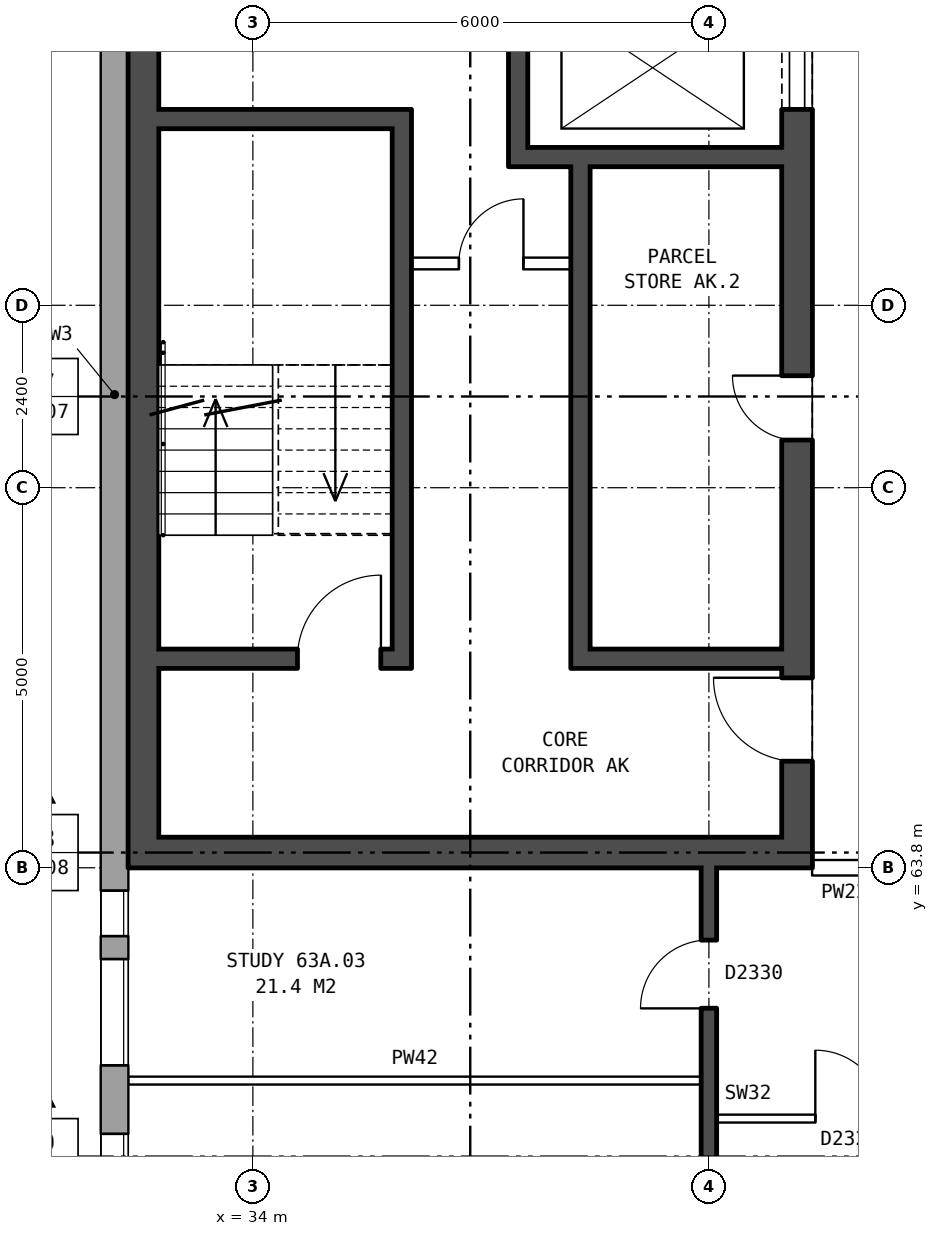
"""IFC4 building model, lengths in metres.
Left out: names, types, materials, properties, quantities, classifications, styles, units other than length and angle.
Written with IfcOpenShell. Run it as: python <this file> out.ifc"""

import sys

from ifc_helpers import new_model, si_unit, direction, frame, frame_2d, origin, place, context, subcontext, project, spatial, rectangle, extrude, element, fill, save


model = new_model("IFC4")
c1 = context("Model", 3, precision=1e-05, world=origin(), true_north=direction((0.0, 1.0)))
c2 = subcontext(c1, "Body", "Model", "MODEL_VIEW")
j1 = project(units=[si_unit("LENGTHUNIT", "METRE"), si_unit("PLANEANGLEUNIT", "RADIAN")], contexts=[c1])
p1 = place(None, origin())
s1 = spatial("IfcSite", under=j1, at=p1, CompositionType="ELEMENT")
p2 = place(p1, origin())
s2 = spatial("IfcBuilding", under=s1, at=p2, CompositionType="ELEMENT")
p3 = place(p2, frame((0.0, 0.0, 224.5)))
s3 = spatial("IfcBuildingStorey", under=s2, at=p3, CompositionType="ELEMENT", Elevation=224.5)
p4 = place(p3, frame((32.18, 82.925, 0.0), z_axis=(0.0, 0.0, 1.0), x_axis=(0.0, -1.0, 0.0)))
e1 = element("IfcWall", 1, at=p4, inside=s3, PredefinedType="STANDARD", context=c2, shape_type="SweptSolid", body=[
    extrude(rectangle(XDim=25.851, YDim=0.36, at=frame_2d((12.925, 0.0))), origin(), (0.0, 0.0, 1.0), 2.85),
])
p5 = place(p4, frame((1.625, 0.0, 0.8)))
e2 = element("IfcOpeningElement", 2, at=p5, cuts=e1, PredefinedType="OPENING", context=c2, shape_type="SweptSolid", body=[
    extrude(rectangle(XDim=1.6, YDim=1.8, at=frame_2d((0.8, 0.9))), frame((0.0, 0.19, 0.0), z_axis=(0.0, -1.0, 0.0), x_axis=(1.0, 0.0, 0.0)), (0.0, 0.0, 1.0), 0.38),
])
p6 = place(p4, frame((4.075, 0.0, 0.8)))
e3 = element("IfcOpeningElement", 3, at=p6, cuts=e1, PredefinedType="OPENING", context=c2, shape_type="SweptSolid", body=[
    extrude(rectangle(XDim=1.4, YDim=1.8, at=frame_2d((0.7, 0.9))), frame((0.0, 0.19, 0.0), z_axis=(0.0, -1.0, 0.0), x_axis=(1.0, 0.0, 0.0)), (0.0, 0.0, 1.0), 0.38),
])
p7 = place(p4, frame((19.425, 0.0, 0.8)))
e4 = element("IfcOpeningElement", 4, at=p7, cuts=e1, PredefinedType="OPENING", context=c2, shape_type="SweptSolid", body=[
    extrude(rectangle(XDim=0.6, YDim=0.9, at=frame_2d((0.3, 0.45))), frame((0.0, 0.19, 0.0), z_axis=(0.0, -1.0, 0.0), x_axis=(1.0, 0.0, 0.0)), (0.0, 0.0, 1.0), 0.38),
])
p8 = place(p4, frame((22.625, 0.0, 0.8)))
e5 = element("IfcOpeningElement", 5, at=p8, cuts=e1, PredefinedType="OPENING", context=c2, shape_type="SweptSolid", body=[
    extrude(rectangle(XDim=1.6, YDim=1.8, at=frame_2d((0.8, 0.9))), frame((0.0, 0.19, 0.0), z_axis=(0.0, -1.0, 0.0), x_axis=(1.0, 0.0, 0.0)), (0.0, 0.0, 1.0), 0.38),
])
p9 = place(p4, frame((5.775, 0.0, 0.8)))
e6 = element("IfcOpeningElement", 6, at=p9, cuts=e1, PredefinedType="OPENING", context=c2, shape_type="SweptSolid", body=[
    extrude(rectangle(XDim=0.6, YDim=0.9, at=frame_2d((0.3, 0.45))), frame((0.0, 0.19, 0.0), z_axis=(0.0, -1.0, 0.0), x_axis=(1.0, 0.0, 0.0)), (0.0, 0.0, 1.0), 0.38),
])
p10 = place(p4, frame((20.325, 0.0, 0.8)))
e7 = element("IfcOpeningElement", 7, at=p10, cuts=e1, PredefinedType="OPENING", context=c2, shape_type="SweptSolid", body=[
    extrude(rectangle(XDim=1.4, YDim=1.8, at=frame_2d((0.7, 0.9))), frame((0.0, 0.19, 0.0), z_axis=(0.0, -1.0, 0.0), x_axis=(1.0, 0.0, 0.0)), (0.0, 0.0, 1.0), 0.38),
])
p11 = place(p3, frame((41.16, 76.2, 0.0), z_axis=(0.0, 0.0, 1.0), x_axis=(0.0, -1.0, 0.0)))
e8 = element("IfcWall", 8, at=p11, inside=s3, PredefinedType="SHEAR", context=c2, shape_type="SweptSolid", body=[
    extrude(rectangle(XDim=12.4, YDim=0.4, at=frame_2d((6.2, 0.0))), origin(), (0.0, 0.0, 1.0), 2.85),
])
p12 = place(p11, frame((1.325, 0.0, 0.0)))
e9 = element("IfcOpeningElement", 9, at=p12, cuts=e8, PredefinedType="OPENING", context=c2, shape_type="SweptSolid", body=[
    extrude(rectangle(XDim=1.1, YDim=2.1, at=frame_2d((0.55, 1.05))), frame((0.0, 0.21, 0.0), z_axis=(0.0, -1.0, 0.0), x_axis=(1.0, 0.0, 0.0)), (0.0, 0.0, 1.0), 0.42),
])
p13 = place(p11, frame((5.925, 0.0, 0.0)))
e10 = element("IfcOpeningElement", 10, at=p13, cuts=e8, PredefinedType="OPENING", context=c2, shape_type="SweptSolid", body=[
    extrude(rectangle(XDim=0.85, YDim=2.1, at=frame_2d((0.425, 1.05))), frame((0.0, 0.21, 0.0), z_axis=(0.0, -1.0, 0.0), x_axis=(1.0, 0.0, 0.0)), (0.0, 0.0, 1.0), 0.42),
])
p14 = place(p11, frame((9.9, 0.0, 0.0)))
e11 = element("IfcOpeningElement", 11, at=p14, cuts=e8, PredefinedType="OPENING", context=c2, shape_type="SweptSolid", body=[
    extrude(rectangle(XDim=1.1, YDim=2.1, at=frame_2d((0.55, 1.05))), frame((0.0, 0.21, 0.0), z_axis=(0.0, -1.0, 0.0), x_axis=(1.0, 0.0, 0.0)), (0.0, 0.0, 1.0), 0.42),
])
p15 = place(p3, frame((32.56, 76.2, 0.0), z_axis=(0.0, 0.0, 1.0), x_axis=(0.0, -1.0, 0.0)))
e12 = element("IfcWall", 12, at=p15, inside=s3, PredefinedType="SHEAR", context=c2, shape_type="SweptSolid", body=[
    extrude(rectangle(XDim=12.4, YDim=0.4, at=frame_2d((6.2, 0.0))), origin(), (0.0, 0.0, 1.0), 2.85),
])
p16 = place(p3, frame((40.96, 64.0, 0.0), z_axis=(0.0, 0.0, 1.0), x_axis=(-1.0, 0.0, 0.0)))
e13 = element("IfcWall", 13, at=p16, inside=s3, PredefinedType="SHEAR", context=c2, shape_type="SweptSolid", body=[
    extrude(rectangle(XDim=8.2, YDim=0.4, at=frame_2d((4.1, 0.0))), origin(), (0.0, 0.0, 1.0), 2.85),
])
p17 = place(p3, frame((35.835, 73.65, 0.0), z_axis=(0.0, 0.0, 1.0), x_axis=(-1.0, 0.0, 0.0)))
e14 = element("IfcWall", 14, at=p17, inside=s3, PredefinedType="SHEAR", context=c2, shape_type="SweptSolid", body=[
    extrude(rectangle(XDim=3.075, YDim=0.25, at=frame_2d((1.538, 0.0))), origin(), (0.0, 0.0, 1.0), 2.85),
])
p18 = place(p3, frame((40.96, 73.15, 0.0), z_axis=(0.0, 0.0, 1.0), x_axis=(-1.0, 0.0, 0.0)))
e15 = element("IfcWall", 15, at=p18, inside=s3, PredefinedType="SHEAR", context=c2, shape_type="SweptSolid", body=[
    extrude(rectangle(XDim=3.595, YDim=0.25, at=frame_2d((1.797, 0.0))), origin(), (0.0, 0.0, 1.0), 2.85),
])
p19 = place(p3, frame((38.185, 71.75, 0.0), z_axis=(0.0, 0.0, 1.0), x_axis=(-1.0, 0.0, 0.0)))
e16 = element("IfcWall", 16, at=p19, inside=s3, PredefinedType="PARTITIONING", context=c2, shape_type="SweptSolid", body=[
    extrude(rectangle(XDim=2.1, YDim=0.15, at=frame_2d((1.05, 0.0))), origin(), (0.0, 0.0, 1.0), 2.85),
])
p20 = place(p19, frame((0.625, 0.0, 0.0)))
e17 = element("IfcOpeningElement", 17, at=p20, cuts=e16, PredefinedType="OPENING", context=c2, shape_type="SweptSolid", body=[
    extrude(rectangle(XDim=0.85, YDim=2.1, at=frame_2d((0.425, 1.05))), frame((0.0, 0.085, 0.0), z_axis=(0.0, -1.0, 0.0), x_axis=(1.0, 0.0, 0.0)), (0.0, 0.0, 1.0), 0.17),
])
p21 = place(p3, frame((40.96, 66.55, 0.0), z_axis=(0.0, 0.0, 1.0), x_axis=(-1.0, 0.0, 0.0)))
e18 = element("IfcWall", 18, at=p21, inside=s3, PredefinedType="SHEAR", context=c2, shape_type="SweptSolid", body=[
    extrude(rectangle(XDim=2.525, YDim=0.25, at=frame_2d((1.262, 0.0))), origin(), (0.0, 0.0, 1.0), 2.85),
])
p22 = place(p3, frame((35.835, 66.55, 0.0), z_axis=(0.0, 0.0, 1.0), x_axis=(-1.0, 0.0, 0.0)))
e19 = element("IfcWall", 19, at=p22, inside=s3, PredefinedType="SHEAR", context=c2, shape_type="SweptSolid", body=[
    extrude(rectangle(XDim=3.075, YDim=0.25, at=frame_2d((1.538, 0.0))), origin(), (0.0, 0.0, 1.0), 2.85),
])
p23 = place(p22, frame((0.15, 0.0, 0.0)))
e20 = element("IfcOpeningElement", 20, at=p23, cuts=e19, PredefinedType="OPENING", context=c2, shape_type="SweptSolid", body=[
    extrude(rectangle(XDim=1.1, YDim=2.1, at=frame_2d((0.55, 1.05))), frame((0.0, 0.135, 0.0), z_axis=(0.0, -1.0, 0.0), x_axis=(1.0, 0.0, 0.0)), (0.0, 0.0, 1.0), 0.27),
])
p24 = place(p3, frame((38.31, 73.025, 0.0), z_axis=(0.0, 0.0, 1.0), x_axis=(0.0, -1.0, 0.0)))
e21 = element("IfcWall", 21, at=p24, inside=s3, PredefinedType="SHEAR", context=c2, shape_type="SweptSolid", body=[
    extrude(rectangle(XDim=6.6, YDim=0.25, at=frame_2d((3.3, 0.0))), origin(), (0.0, 0.0, 1.0), 2.85),
])
p25 = place(p3, frame((37.49, 75.8, 0.0), z_axis=(0.0, 0.0, 1.0), x_axis=(0.0, -1.0, 0.0)))
e22 = element("IfcWall", 22, at=p25, inside=s3, PredefinedType="SHEAR", context=c2, shape_type="SweptSolid", body=[
    extrude(rectangle(XDim=2.525, YDim=0.25, at=frame_2d((1.263, 0.0))), origin(), (0.0, 0.0, 1.0), 2.85),
])
p26 = place(p3, frame((35.96, 73.775, 0.0), z_axis=(0.0, 0.0, 1.0), x_axis=(0.0, -1.0, 0.0)))
e23 = element("IfcWall", 23, at=p26, inside=s3, PredefinedType="SHEAR", context=c2, shape_type="SweptSolid", body=[
    extrude(rectangle(XDim=7.35, YDim=0.25, at=frame_2d((3.675, 0.0))), origin(), (0.0, 0.0, 1.0), 2.85),
])
p27 = place(p3, frame((40.1, 60.5, 0.0), z_axis=(0.0, 0.0, 1.0), x_axis=(1.0, 0.0, 0.0)))
e24 = element("IfcWall", 24, at=p27, inside=s3, PredefinedType="PARTITIONING", context=c2, shape_type="SweptSolid", body=[
    extrude(rectangle(XDim=5.8, YDim=0.1, at=frame_2d((2.9, 0.0))), origin(), (0.0, 0.0, 1.0), 2.85),
])
p28 = place(p27, frame((1.3, 0.0, 0.0)))
e25 = element("IfcOpeningElement", 25, at=p28, cuts=e24, PredefinedType="OPENING", context=c2, shape_type="SweptSolid", body=[
    extrude(rectangle(XDim=0.9, YDim=2.1, at=frame_2d((0.45, 1.05))), frame((0.0, 0.06, 0.0), z_axis=(0.0, -1.0, 0.0), x_axis=(1.0, 0.0, 0.0)), (0.0, 0.0, 1.0), 0.12),
])
p29 = place(p27, frame((4.2, 0.0, 0.0)))
e26 = element("IfcOpeningElement", 26, at=p29, cuts=e24, PredefinedType="OPENING", context=c2, shape_type="SweptSolid", body=[
    extrude(rectangle(XDim=0.9, YDim=2.1, at=frame_2d((0.45, 1.05))), frame((0.0, 0.06, 0.0), z_axis=(0.0, -1.0, 0.0), x_axis=(1.0, 0.0, 0.0)), (0.0, 0.0, 1.0), 0.12),
])
p30 = place(p3, frame((32.36, 61.0, 0.0), z_axis=(0.0, 0.0, 1.0), x_axis=(1.0, 0.0, 0.0)))
e27 = element("IfcWall", 27, at=p30, inside=s3, PredefinedType="PARTITIONING", context=c2, shape_type="SweptSolid", body=[
    extrude(rectangle(XDim=7.54, YDim=0.1, at=frame_2d((3.77, 0.0))), origin(), (0.0, 0.0, 1.0), 2.85),
])
p31 = place(p3, frame((41.36, 63.8, 0.0), z_axis=(0.0, 0.0, 1.0), x_axis=(1.0, 0.0, 0.0)))
e28 = element("IfcWall", 28, at=p31, inside=s3, PredefinedType="PARTITIONING", context=c2, shape_type="SweptSolid", body=[
    extrude(rectangle(XDim=3.0, YDim=0.2, at=frame_2d((1.5, 0.0))), origin(), (0.0, 0.0, 1.0), 2.85),
])
p32 = place(p31, frame((1.0, 0.0, 0.0)))
e29 = element("IfcOpeningElement", 29, at=p32, cuts=e28, PredefinedType="OPENING", context=c2, shape_type="SweptSolid", body=[
    extrude(rectangle(XDim=1.0, YDim=2.1, at=frame_2d((0.5, 1.05))), frame((0.0, 0.11, 0.0), z_axis=(0.0, -1.0, 0.0), x_axis=(1.0, 0.0, 0.0)), (0.0, 0.0, 1.0), 0.22),
])
p33 = place(p3, frame((40.0, 54.36, 0.0), z_axis=(0.0, 0.0, 1.0), x_axis=(0.0, 1.0, 0.0)))
e30 = element("IfcWall", 30, at=p33, inside=s3, PredefinedType="SOLIDWALL", context=c2, shape_type="SweptSolid", body=[
    extrude(rectangle(XDim=9.44, YDim=0.2, at=frame_2d((4.72, 0.0))), origin(), (0.0, 0.0, 1.0), 2.85),
])
p34 = place(p33, frame((1.37, 0.0, 0.0)))
e31 = element("IfcOpeningElement", 31, at=p34, cuts=e30, PredefinedType="OPENING", context=c2, shape_type="SweptSolid", body=[
    extrude(rectangle(XDim=0.9, YDim=2.1, at=frame_2d((0.45, 1.05))), frame((0.0, 0.11, 0.0), z_axis=(0.0, -1.0, 0.0), x_axis=(1.0, 0.0, 0.0)), (0.0, 0.0, 1.0), 0.22),
])
p35 = place(p33, frame((4.44, 0.0, 0.0)))
e32 = element("IfcOpeningElement", 32, at=p35, cuts=e30, PredefinedType="OPENING", context=c2, shape_type="SweptSolid", body=[
    extrude(rectangle(XDim=0.9, YDim=2.1, at=frame_2d((0.45, 1.05))), frame((0.0, 0.11, 0.0), z_axis=(0.0, -1.0, 0.0), x_axis=(1.0, 0.0, 0.0)), (0.0, 0.0, 1.0), 0.22),
])
p36 = place(p33, frame((7.59, 0.0, 0.0)))
e33 = element("IfcOpeningElement", 33, at=p36, cuts=e30, PredefinedType="OPENING", context=c2, shape_type="SweptSolid", body=[
    extrude(rectangle(XDim=0.9, YDim=2.1, at=frame_2d((0.45, 1.05))), frame((0.0, 0.11, 0.0), z_axis=(0.0, -1.0, 0.0), x_axis=(1.0, 0.0, 0.0)), (0.0, 0.0, 1.0), 0.22),
])
p37 = place(p7, origin())
e34 = element("IfcWindow", 34, at=p37, inside=s3, PartitioningType="SINGLE_PANEL", PredefinedType="WINDOW", context=c2, shape_type="SweptSolid", body=[
    extrude(rectangle(XDim=0.6, YDim=0.9, at=frame_2d((0.3, 0.45))), frame((0.0, 0.15, 0.0), z_axis=(0.0, -1.0, 0.0), x_axis=(1.0, 0.0, 0.0)), (0.0, 0.0, 1.0), 0.06),
])
fill(e4, e34)
p38 = place(p8, origin())
e35 = element("IfcWindow", 35, at=p38, inside=s3, PartitioningType="SINGLE_PANEL", PredefinedType="WINDOW", context=c2, shape_type="SweptSolid", body=[
    extrude(rectangle(XDim=1.6, YDim=1.8, at=frame_2d((0.8, 0.9))), frame((0.0, 0.15, 0.0), z_axis=(0.0, -1.0, 0.0), x_axis=(1.0, 0.0, 0.0)), (0.0, 0.0, 1.0), 0.06),
])
fill(e5, e35)
p39 = place(p12, origin())
e36 = element("IfcDoor", 36, at=p39, inside=s3, OperationType="DOUBLE_DOOR_SLIDING", PredefinedType="DOOR", context=c2, shape_type="SweptSolid", body=[
    extrude(rectangle(XDim=1.1, YDim=2.1, at=frame_2d((0.55, 1.05))), frame((0.0, -0.135, 0.0), z_axis=(0.0, -1.0, 0.0), x_axis=(1.0, 0.0, 0.0)), (0.0, 0.0, 1.0), 0.05),
])
fill(e9, e36)
p40 = place(p13, frame((0.85, 0.0, 0.0), z_axis=(0.0, 0.0, 1.0), x_axis=(-1.0, 0.0, 0.0)))
e37 = element("IfcDoor", 37, at=p40, inside=s3, OperationType="SINGLE_SWING_RIGHT", PredefinedType="DOOR", context=c2, shape_type="SweptSolid", body=[
    extrude(rectangle(XDim=0.85, YDim=2.1, at=frame_2d((0.425, 1.05))), frame((0.0, 0.185, 0.0), z_axis=(0.0, -1.0, 0.0), x_axis=(1.0, 0.0, 0.0)), (0.0, 0.0, 1.0), 0.05),
])
fill(e10, e37)
p41 = place(p14, frame((1.1, 0.0, 0.0), z_axis=(0.0, 0.0, 1.0), x_axis=(-1.0, 0.0, 0.0)))
e38 = element("IfcDoor", 38, at=p41, inside=s3, OperationType="SINGLE_SWING_RIGHT", PredefinedType="DOOR", context=c2, shape_type="SweptSolid", body=[
    extrude(rectangle(XDim=1.1, YDim=2.1, at=frame_2d((0.55, 1.05))), frame((0.0, 0.185, 0.0), z_axis=(0.0, -1.0, 0.0), x_axis=(1.0, 0.0, 0.0)), (0.0, 0.0, 1.0), 0.05),
])
fill(e11, e38)
p42 = place(p23, frame((1.1, 0.0, 0.0), z_axis=(0.0, 0.0, 1.0), x_axis=(-1.0, 0.0, 0.0)))
e39 = element("IfcDoor", 39, at=p42, inside=s3, OperationType="SINGLE_SWING_RIGHT", PredefinedType="DOOR", context=c2, shape_type="SweptSolid", body=[
    extrude(rectangle(XDim=1.1, YDim=2.1, at=frame_2d((0.55, 1.05))), frame((0.0, 0.025, 0.0), z_axis=(0.0, -1.0, 0.0), x_axis=(1.0, 0.0, 0.0)), (0.0, 0.0, 1.0), 0.05),
])
fill(e20, e39)
p43 = place(p20, frame((0.85, 0.0, 0.0), z_axis=(0.0, 0.0, 1.0), x_axis=(-1.0, 0.0, 0.0)))
e40 = element("IfcDoor", 40, at=p43, inside=s3, OperationType="SINGLE_SWING_RIGHT", PredefinedType="DOOR", context=c2, shape_type="SweptSolid", body=[
    extrude(rectangle(XDim=0.85, YDim=2.1, at=frame_2d((0.425, 1.05))), frame((0.0, 0.025, 0.0), z_axis=(0.0, -1.0, 0.0), x_axis=(1.0, 0.0, 0.0)), (0.0, 0.0, 1.0), 0.05),
])
fill(e17, e40)
p44 = place(p36, origin())
e41 = element("IfcDoor", 41, at=p44, inside=s3, OperationType="SINGLE_SWING_LEFT", PredefinedType="DOOR", context=c2, shape_type="SweptSolid", body=[
    extrude(rectangle(XDim=0.9, YDim=2.1, at=frame_2d((0.45, 1.05))), frame((0.0, 0.025, 0.0), z_axis=(0.0, -1.0, 0.0), x_axis=(1.0, 0.0, 0.0)), (0.0, 0.0, 1.0), 0.05),
])
fill(e33, e41)
p45 = place(p28, origin())
e42 = element("IfcDoor", 42, at=p45, inside=s3, OperationType="SINGLE_SWING_LEFT", PredefinedType="DOOR", context=c2, shape_type="SweptSolid", body=[
    extrude(rectangle(XDim=0.9, YDim=2.1, at=frame_2d((0.45, 1.05))), frame((0.0, 0.025, 0.0), z_axis=(0.0, -1.0, 0.0), x_axis=(1.0, 0.0, 0.0)), (0.0, 0.0, 1.0), 0.05),
])
fill(e25, e42)
p46 = place(p10, origin())
e43 = element("IfcWindow", 43, at=p46, inside=s3, PartitioningType="SINGLE_PANEL", PredefinedType="WINDOW", context=c2, shape_type="SweptSolid", body=[
    extrude(rectangle(XDim=1.4, YDim=1.8, at=frame_2d((0.7, 0.9))), frame((0.0, 0.15, 0.0), z_axis=(0.0, -1.0, 0.0), x_axis=(1.0, 0.0, 0.0)), (0.0, 0.0, 1.0), 0.06),
])
fill(e7, e43)
save(model, sys.argv[1])
